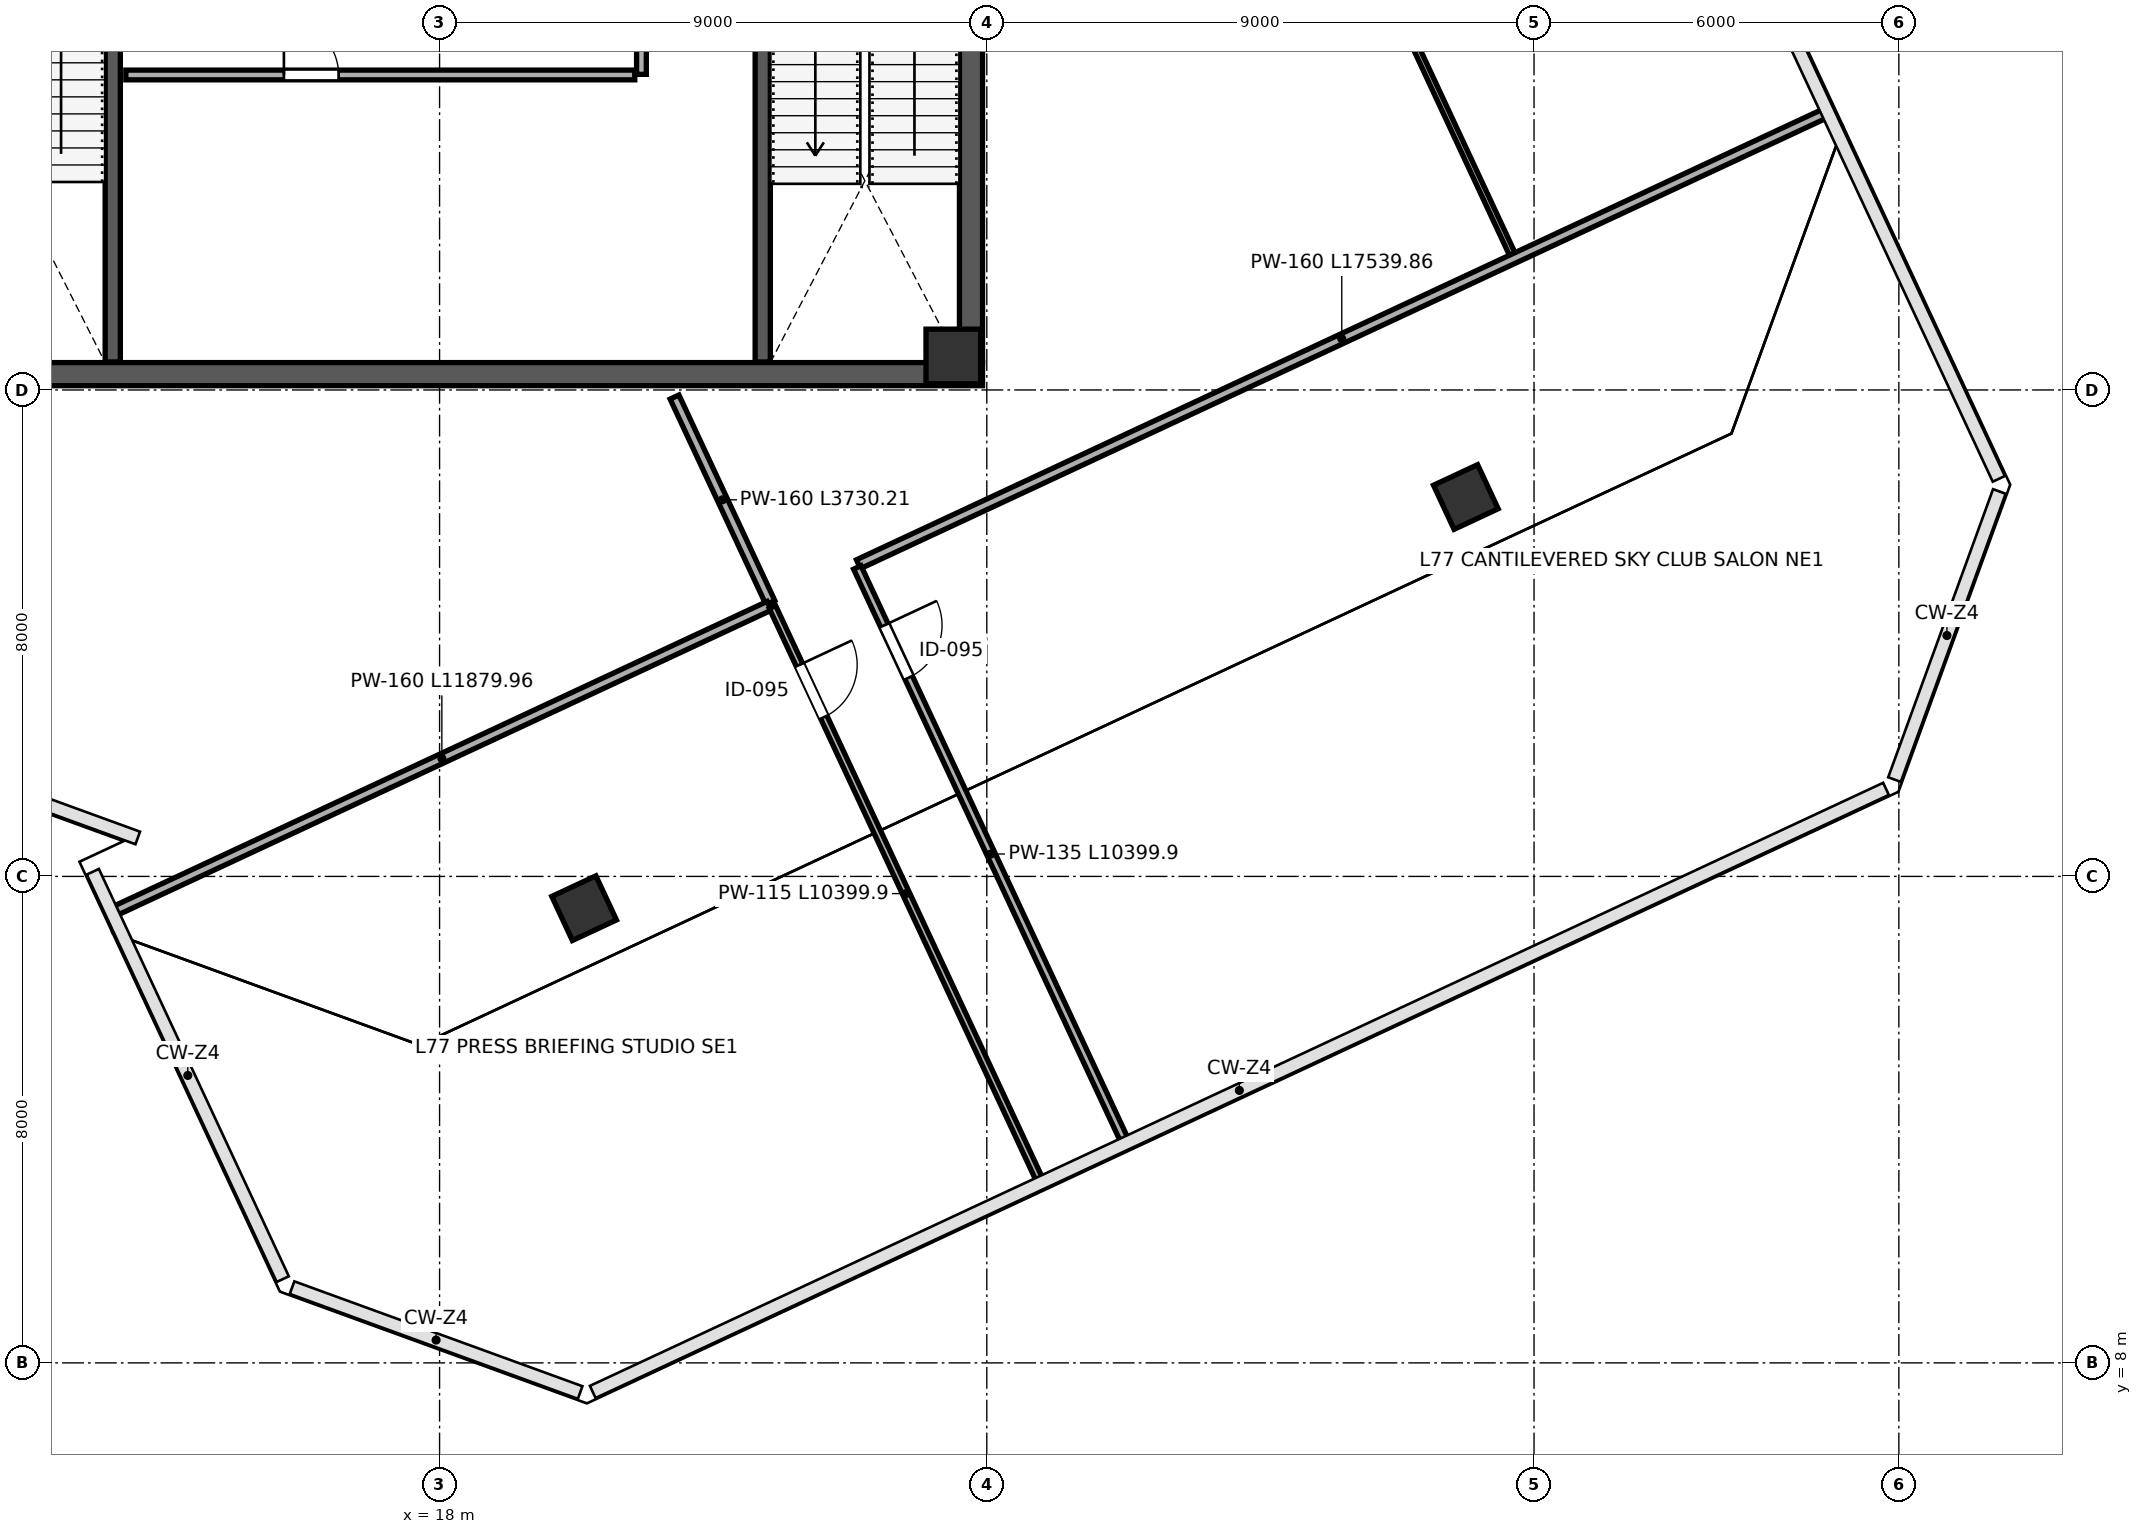
"""IFC4 building model, lengths in metres.
Left out: names, types, materials, properties, quantities, classifications, styles, units other than length and angle.
Written with IfcOpenShell. Run it as: python <this file> out.ifc"""

import sys

from ifc_helpers import new_model, si_unit, direction, frame, frame_2d, origin, origin_2d, place, context, subcontext, project, spatial, rectangle, extrude, source, transform, mapped, element, fill, save


model = new_model("IFC4")
c1 = context("Model", 3, precision=1e-05, world=origin(), true_north=direction((0.0, 1.0)))
c2 = subcontext(c1, "Body", "Model", "MODEL_VIEW")
j1 = project(units=[si_unit("LENGTHUNIT", "METRE"), si_unit("PLANEANGLEUNIT", "RADIAN")], contexts=[c1])
p1 = place(None, origin())
s1 = spatial("IfcSite", under=j1, at=p1, CompositionType="ELEMENT")
p2 = place(p1, origin())
s2 = spatial("IfcBuilding", under=s1, at=p2, CompositionType="ELEMENT")
p3 = place(p2, frame((0.0, 0.0, 340.8)))
s3 = spatial("IfcBuildingStorey", under=s2, at=p3, CompositionType="ELEMENT", Elevation=340.8)
m1 = source(origin(), c2, "Body", "SweptSolid", [
    extrude(rectangle(XDim=0.9, YDim=0.9, at=origin_2d()), origin(), (0.0, 0.0, 1.0), 4.198),
])
p4 = place(p3, frame((26.45, 24.55, 0.001), z_axis=(0.0, 0.0, 1.0), x_axis=(1.0, 0.0, 0.0)))
e1 = element("IfcColumn", 1, at=p4, inside=s3, PredefinedType="COLUMN", context=c2, shape_type="MappedRepresentation", body=[
    mapped(m1, transform((0.0, 0.0, 0.0), scale=1.0)),
])
m2 = source(origin(), c2, "Body", "SweptSolid", [
    extrude(rectangle(XDim=0.8, YDim=0.8, at=origin_2d()), origin(), (0.0, 0.0, 1.0), 4.198),
])
for number, where, z_axis, x_axis in (
    (2, (20.377, 15.478, 0.001), (0.0, 0.0, 1.0), (-0.423, 0.906, 0.0)),
    (3, (34.878, 22.24, 0.001), (0.0, 0.0, 1.0), (-0.423, 0.906, 0.0)),
):
    element("IfcColumn", number, at=place(p3, frame(where, z_axis=z_axis, x_axis=x_axis)), inside=s3, PredefinedType="COLUMN", context=c2, shape_type="MappedRepresentation", body=[
        mapped(m2, transform((0.0, 0.0, 0.0), scale=1.0)),
    ])
p5 = place(p3, frame((26.74, 24.45, 0.0), z_axis=(0.0, 0.0, 1.0), x_axis=(0.0, 1.0, 0.0)))
e4 = element("IfcWall", 4, at=p5, inside=s3, PredefinedType="SHEAR", context=c2, shape_type="SweptSolid", body=[
    extrude(rectangle(XDim=15.1, YDim=0.38, at=frame_2d((7.55, 0.0))), origin(), (0.0, 0.0, 1.0), 3.96),
])
p6 = place(p5, frame((8.6, 0.0, 0.0)))
e5 = element("IfcOpeningElement", 5, at=p6, cuts=e4, PredefinedType="OPENING", context=c2, shape_type="SweptSolid", body=[
    extrude(rectangle(XDim=1.15, YDim=2.2, at=frame_2d((0.575, 1.1))), frame((0.0, 0.2, 0.0), z_axis=(0.0, -1.0, 0.0), x_axis=(1.0, 0.0, 0.0)), (0.0, 0.0, 1.0), 0.4),
])
p7 = place(p3, frame((9.07, 24.26, 0.0), z_axis=(0.0, 0.0, 1.0), x_axis=(1.0, 0.0, 0.0)))
e6 = element("IfcWall", 6, at=p7, inside=s3, PredefinedType="SHEAR", context=c2, shape_type="SweptSolid", body=[
    extrude(rectangle(XDim=17.86, YDim=0.38, at=frame_2d((8.93, 0.0))), origin(), (0.0, 0.0, 1.0), 3.96),
])
p8 = place(p3, frame((12.625, 24.46, 0.0), z_axis=(0.0, 0.0, 1.0), x_axis=(0.0, 1.0, 0.0)))
e7 = element("IfcWall", 7, at=p8, inside=s3, PredefinedType="SHEAR", context=c2, shape_type="SweptSolid", body=[
    extrude(rectangle(XDim=7.49, YDim=0.25, at=frame_2d((3.745, 0.0))), origin(), (0.0, 0.0, 1.0), 3.96),
])
p9 = place(p8, frame((5.85, 0.0, 0.0)))
e8 = element("IfcOpeningElement", 8, at=p9, cuts=e7, PredefinedType="OPENING", context=c2, shape_type="SweptSolid", body=[
    extrude(rectangle(XDim=1.15, YDim=2.2, at=frame_2d((0.575, 1.1))), frame((0.0, 0.135, 0.0), z_axis=(0.0, -1.0, 0.0), x_axis=(1.0, 0.0, 0.0)), (0.0, 0.0, 1.0), 0.27),
])
p10 = place(p3, frame((23.315, 24.46, 0.0), z_axis=(0.0, 0.0, 1.0), x_axis=(0.0, 1.0, 0.0)))
e9 = element("IfcWall", 9, at=p10, inside=s3, PredefinedType="SHEAR", context=c2, shape_type="SweptSolid", body=[
    extrude(rectangle(XDim=7.49, YDim=0.25, at=frame_2d((3.745, 0.0))), origin(), (0.0, 0.0, 1.0), 3.96),
])
p11 = place(p3, frame((12.84, 29.18, 0.0), z_axis=(0.0, 0.0, 1.0), x_axis=(1.0, 0.0, 0.0)))
e10 = element("IfcWall", 10, at=p11, inside=s3, PredefinedType="PARTITIONING", context=c2, shape_type="SweptSolid", body=[
    extrude(rectangle(XDim=8.37, YDim=0.16, at=frame_2d((4.185, 0.0))), origin(), (0.0, 0.0, 1.0), 3.96),
])
p12 = place(p11, frame((2.6, 0.0, 0.0)))
e11 = element("IfcOpeningElement", 11, at=p12, cuts=e10, PredefinedType="OPENING", context=c2, shape_type="SweptSolid", body=[
    extrude(rectangle(XDim=0.9, YDim=2.15, at=frame_2d((0.45, 1.075))), frame((0.0, 0.09, 0.0), z_axis=(0.0, -1.0, 0.0), x_axis=(1.0, 0.0, 0.0)), (0.0, 0.0, 1.0), 0.18),
])
p13 = place(p3, frame((21.32, 29.19, 0.0), z_axis=(0.0, 0.0, 1.0), x_axis=(0.0, 1.0, 0.0)))
e12 = element("IfcWall", 12, at=p13, inside=s3, PredefinedType="PARTITIONING", context=c2, shape_type="SweptSolid", body=[
    extrude(rectangle(XDim=2.92, YDim=0.16, at=frame_2d((1.46, 0.0))), origin(), (0.0, 0.0, 1.0), 3.96),
])
p14 = place(p3, frame((21.864, 23.884, 0.0), z_axis=(0.0, 0.0, 1.0), x_axis=(0.42259522887, -0.906318527085, 0.0)))
e13 = element("IfcWall", 13, at=p14, inside=s3, PredefinedType="PARTITIONING", context=c2, shape_type="SweptSolid", body=[
    extrude(rectangle(XDim=3.73, YDim=0.16, at=frame_2d((1.865, 0.0))), origin(), (0.0, 0.0, 1.0), 3.96),
])
p15 = place(p3, frame((24.775, 49.537, 0.0), z_axis=(0.0, 0.0, 1.0), x_axis=(0.422615543458, -0.906309054588, 0.0)))
e14 = element("IfcWall", 14, at=p15, inside=s3, PredefinedType="PARTITIONING", context=c2, shape_type="SweptSolid", body=[
    extrude(rectangle(XDim=25.75, YDim=0.1, at=frame_2d((12.875, 0.0))), origin(), (0.0, 0.0, 1.0), 3.96),
])
p16 = place(p15, frame((4.3, 0.0, 0.0)))
e15 = element("IfcOpeningElement", 15, at=p16, cuts=e14, PredefinedType="OPENING", context=c2, shape_type="SweptSolid", body=[
    extrude(rectangle(XDim=0.95, YDim=2.15, at=frame_2d((0.475, 1.075))), frame((0.0, 0.06, 0.0), z_axis=(0.0, -1.0, 0.0), x_axis=(1.0, 0.0, 0.0)), (0.0, 0.0, 1.0), 0.12),
])
p17 = place(p3, frame((24.89, 21.135, 0.0), z_axis=(0.0, 0.0, 1.0), x_axis=(0.906308982529, 0.42261569799, 0.0)))
e16 = element("IfcWall", 16, at=p17, inside=s3, PredefinedType="PARTITIONING", context=c2, shape_type="SweptSolid", body=[
    extrude(rectangle(XDim=17.54, YDim=0.16, at=frame_2d((8.77, 0.0))), origin(), (0.0, 0.0, 1.0), 3.96),
])
p18 = place(p3, frame((12.654, 15.429, 0.0), z_axis=(0.0, 0.0, 1.0), x_axis=(0.906316447934, 0.42259968789, 0.0)))
e17 = element("IfcWall", 17, at=p18, inside=s3, PredefinedType="PARTITIONING", context=c2, shape_type="SweptSolid", body=[
    extrude(rectangle(XDim=11.88, YDim=0.16, at=frame_2d((5.94, 0.0))), origin(), (0.0, 0.0, 1.0), 3.96),
])
p19 = place(p3, frame((24.87, 21.081, 0.0), z_axis=(0.0, 0.0, 1.0), x_axis=(0.422623279804, -0.906305447058, 0.0)))
e18 = element("IfcWall", 18, at=p19, inside=s3, PredefinedType="PARTITIONING", context=c2, shape_type="SweptSolid", body=[
    extrude(rectangle(XDim=10.4, YDim=0.135, at=frame_2d((5.2, 0.0))), origin(), (0.0, 0.0, 1.0), 3.252),
])
p20 = place(p19, frame((1.05, 0.0, 0.0)))
e19 = element("IfcOpeningElement", 19, at=p20, cuts=e18, PredefinedType="OPENING", context=c2, shape_type="SweptSolid", body=[
    extrude(rectangle(XDim=0.95, YDim=2.15, at=frame_2d((0.475, 1.075))), frame((0.0, 0.078, 0.0), z_axis=(0.0, -1.0, 0.0), x_axis=(1.0, 0.0, 0.0)), (0.0, 0.0, 1.0), 0.155),
])
p21 = place(p3, frame((23.475, 20.43, 0.0), z_axis=(0.0, 0.0, 1.0), x_axis=(0.422603997267, -0.906314438533, 0.0)))
e20 = element("IfcWall", 20, at=p21, inside=s3, PredefinedType="PARTITIONING", context=c2, shape_type="SweptSolid", body=[
    extrude(rectangle(XDim=10.4, YDim=0.115, at=frame_2d((5.2, 0.0))), origin(), (0.0, 0.0, 1.0), 3.252),
])
p22 = place(p21, frame((1.05, 0.0, 0.0)))
e21 = element("IfcOpeningElement", 21, at=p22, cuts=e20, PredefinedType="OPENING", context=c2, shape_type="SweptSolid", body=[
    extrude(rectangle(XDim=0.95, YDim=2.15, at=frame_2d((0.475, 1.075))), frame((0.0, 0.067, 0.0), z_axis=(0.0, -1.0, 0.0), x_axis=(1.0, 0.0, 0.0)), (0.0, 0.0, 1.0), 0.135),
])
m3 = source(origin(), c2, "Body", "SweptSolid", [
    extrude(rectangle(XDim=0.9, YDim=2.15, at=frame_2d((0.45, 1.075))), frame((0.0, 0.025, 0.0), z_axis=(0.0, -1.0, 0.0), x_axis=(1.0, 0.0, 0.0)), (0.0, 0.0, 1.0), 0.05),
])
p23 = place(p12, origin())
e22 = element("IfcDoor", 22, at=p23, inside=s3, OperationType="SINGLE_SWING_LEFT", PredefinedType="DOOR", context=c2, shape_type="MappedRepresentation", body=[
    mapped(m3, transform((0.0, 0.0, 0.0), scale=1.0)),
])
fill(e11, e22)
m4 = source(origin(), c2, "Body", "SweptSolid", [
    extrude(rectangle(XDim=0.95, YDim=2.15, at=frame_2d((0.475, 1.075))), frame((0.0, 0.025, 0.0), z_axis=(0.0, -1.0, 0.0), x_axis=(1.0, 0.0, 0.0)), (0.0, 0.0, 1.0), 0.05),
])
p24 = place(p20, origin())
e23 = element("IfcDoor", 23, at=p24, inside=s3, OperationType="SINGLE_SWING_LEFT", PredefinedType="DOOR", context=c2, shape_type="MappedRepresentation", body=[
    mapped(m4, transform((0.0, 0.0, 0.0), scale=1.0)),
])
fill(e19, e23)
p25 = place(p22, origin())
e24 = element("IfcDoor", 24, at=p25, inside=s3, OperationType="SINGLE_SWING_LEFT", PredefinedType="DOOR", context=c2, shape_type="MappedRepresentation", body=[
    mapped(m4, transform((0.0, 0.0, 0.0), scale=1.0)),
])
fill(e21, e24)
save(model, sys.argv[1])
